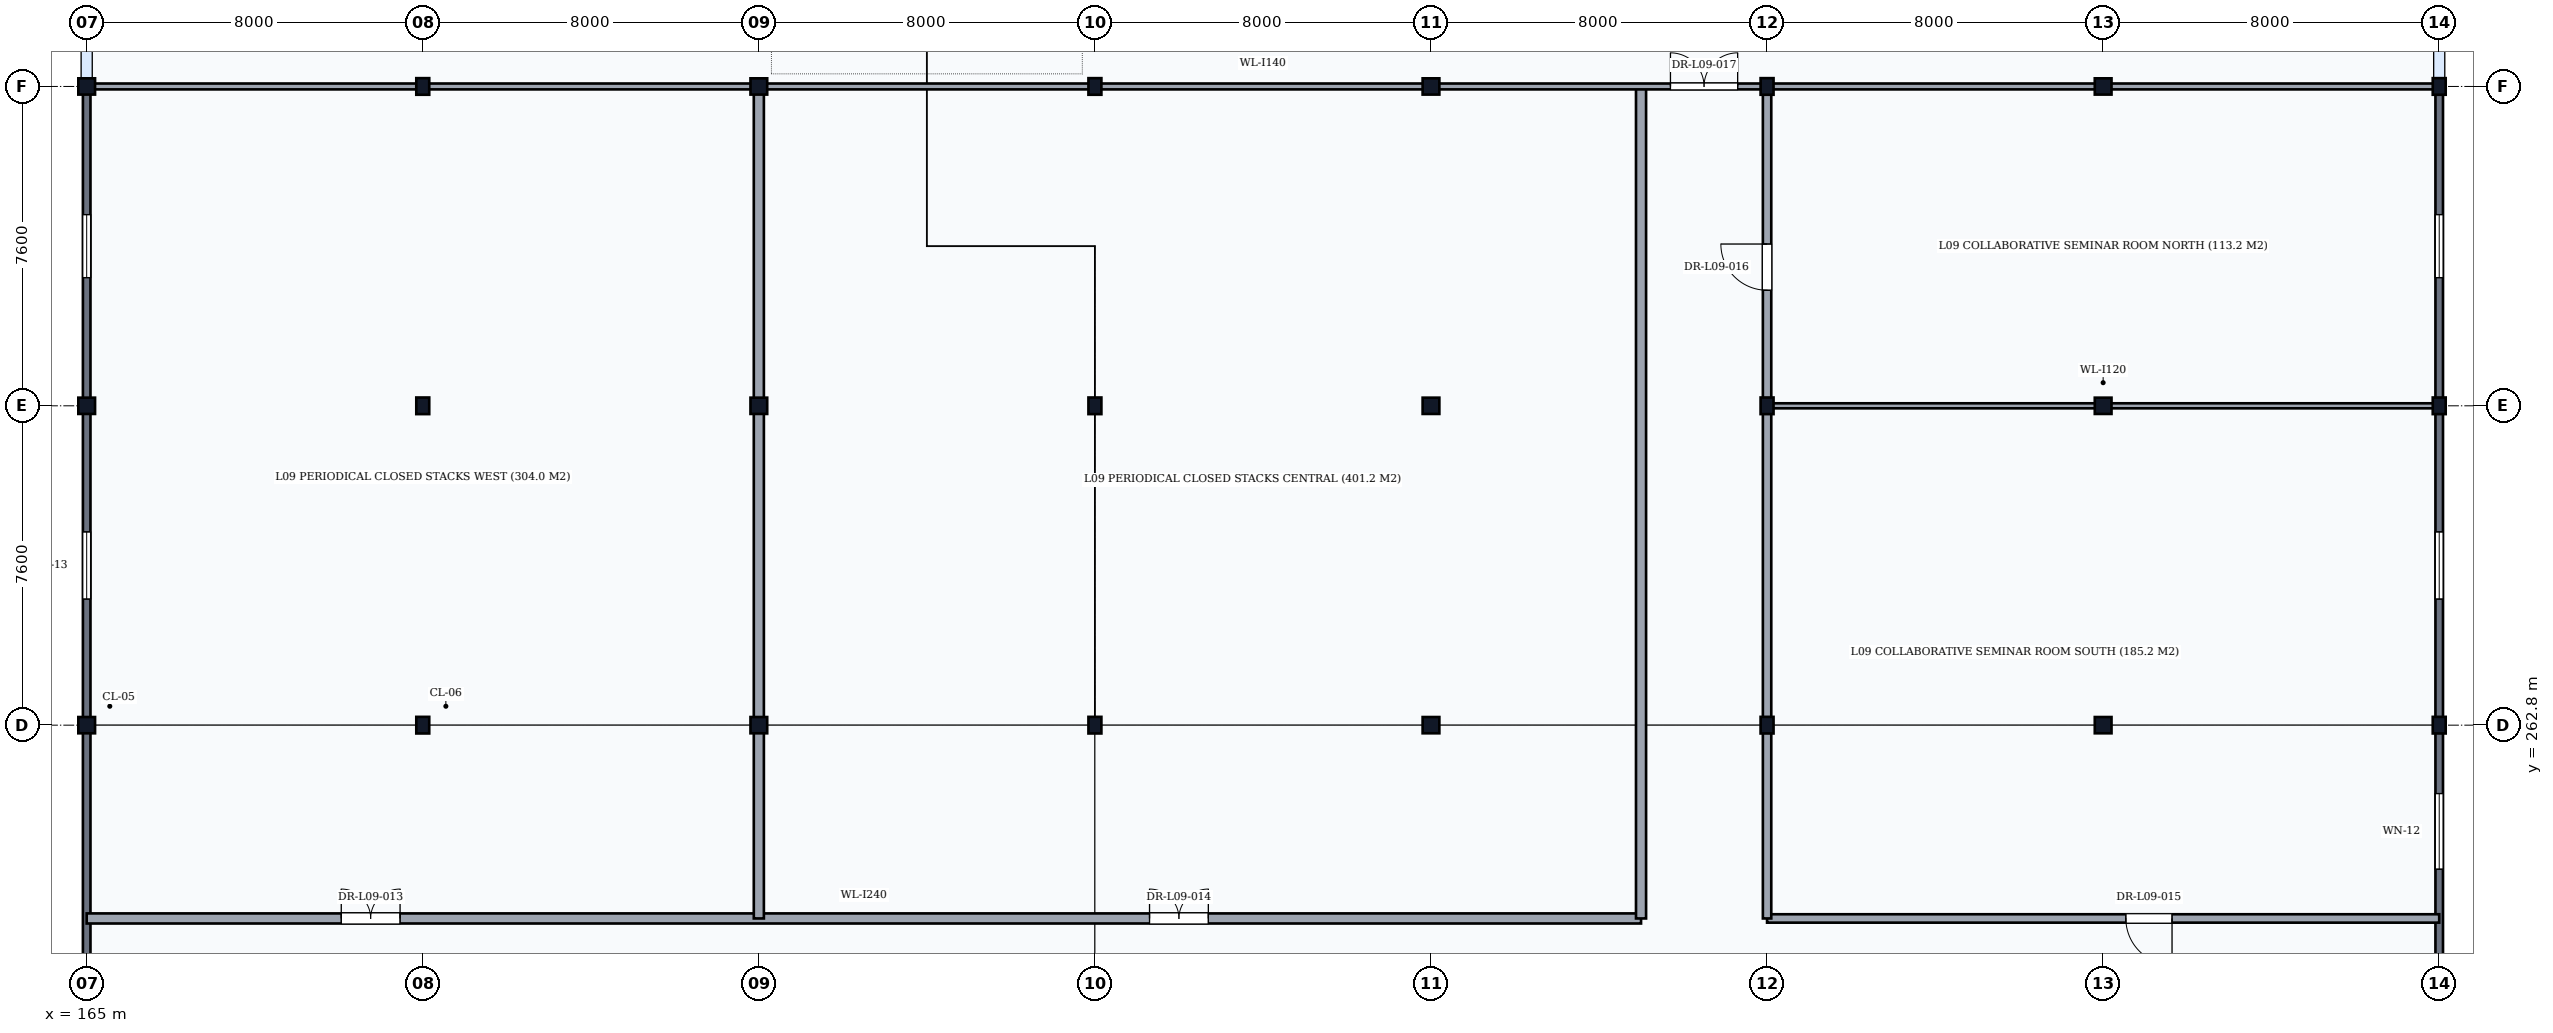
"""IFC4 building model, lengths in metres.
Left out: names, types, materials, properties, quantities, classifications, styles, units other than length and angle.
Written with IfcOpenShell. Run it as: python <this file> out.ifc"""

import sys

from ifc_helpers import new_model, si_unit, direction, frame, frame_2d, origin, origin_2d, place, context, subcontext, project, spatial, rectangle, i_section, extrude, element, fill, save


model = new_model("IFC4")
c1 = context("Model", 3, precision=1e-05, world=origin(), true_north=direction((0.0, 1.0)))
c2 = subcontext(c1, "Body", "Model", "MODEL_VIEW")
j1 = project(units=[si_unit("LENGTHUNIT", "METRE"), si_unit("PLANEANGLEUNIT", "RADIAN")], contexts=[c1])
p1 = place(None, origin())
s1 = spatial("IfcSite", under=j1, at=p1, CompositionType="ELEMENT")
p2 = place(p1, origin())
s2 = spatial("IfcBuilding", under=s1, at=p2, CompositionType="ELEMENT")
p3 = place(p2, frame((0.0, 0.0, 36.0)))
s3 = spatial("IfcBuildingStorey", under=s2, at=p3, CompositionType="ELEMENT", Elevation=36.0)
for number, where, z_axis, x_axis in (
    (1, (165.0, 262.8, 0.0), (0.0, 0.0, 1.0), (1.0, 0.0, 0.0)),
    (2, (165.0, 270.4, 0.0), (0.0, 0.0, 1.0), (1.0, 0.0, 0.0)),
    (3, (165.0, 278.0, 0.0), (0.0, 0.0, 1.0), (1.0, 0.0, 0.0)),
):
    element("IfcColumn", number, at=place(p3, frame(where, z_axis=z_axis, x_axis=x_axis)), inside=s3, PredefinedType="COLUMN", context=c2, shape_type="SweptSolid", body=[
        extrude(i_section(OverallWidth=0.398, OverallDepth=0.387, WebThickness=0.021, FlangeThickness=0.033, FilletRadius=0.015, at=origin_2d()), origin(), (0.0, 0.0, 1.0), 3.9),
    ])
for number, where, z_axis, x_axis in (
    (4, (173.0, 262.8, 0.0), (0.0, 0.0, 1.0), (1.0, 0.0, 0.0)),
    (5, (173.0, 270.4, 0.0), (0.0, 0.0, 1.0), (1.0, 0.0, 0.0)),
    (6, (173.0, 278.0, 0.0), (0.0, 0.0, 1.0), (1.0, 0.0, 0.0)),
):
    element("IfcColumn", number, at=place(p3, frame(where, z_axis=z_axis, x_axis=x_axis)), inside=s3, PredefinedType="COLUMN", context=c2, shape_type="SweptSolid", body=[
        extrude(i_section(OverallWidth=0.308, OverallDepth=0.395, WebThickness=0.021, FlangeThickness=0.04, FilletRadius=0.027, at=origin_2d()), origin(), (0.0, 0.0, 1.0), 3.9),
    ])
for number, where, z_axis, x_axis in (
    (7, (181.0, 262.8, 0.0), (0.0, 0.0, 1.0), (1.0, 0.0, 0.0)),
    (8, (181.0, 270.4, 0.0), (0.0, 0.0, 1.0), (1.0, 0.0, 0.0)),
    (9, (181.0, 278.0, 0.0), (0.0, 0.0, 1.0), (1.0, 0.0, 0.0)),
):
    element("IfcColumn", number, at=place(p3, frame(where, z_axis=z_axis, x_axis=x_axis)), inside=s3, PredefinedType="COLUMN", context=c2, shape_type="SweptSolid", body=[
        extrude(i_section(OverallWidth=0.398, OverallDepth=0.387, WebThickness=0.021, FlangeThickness=0.033, FilletRadius=0.015, at=origin_2d()), origin(), (0.0, 0.0, 1.0), 3.9),
    ])
for number, where, z_axis, x_axis in (
    (10, (189.0, 262.8, 0.0), (0.0, 0.0, 1.0), (1.0, 0.0, 0.0)),
    (11, (189.0, 270.4, 0.0), (0.0, 0.0, 1.0), (1.0, 0.0, 0.0)),
    (12, (189.0, 278.0, 0.0), (0.0, 0.0, 1.0), (1.0, 0.0, 0.0)),
):
    element("IfcColumn", number, at=place(p3, frame(where, z_axis=z_axis, x_axis=x_axis)), inside=s3, PredefinedType="COLUMN", context=c2, shape_type="SweptSolid", body=[
        extrude(i_section(OverallWidth=0.308, OverallDepth=0.395, WebThickness=0.021, FlangeThickness=0.04, FilletRadius=0.027, at=origin_2d()), origin(), (0.0, 0.0, 1.0), 3.9),
    ])
for number, where, z_axis, x_axis in (
    (13, (197.0, 262.8, 0.0), (0.0, 0.0, 1.0), (1.0, 0.0, 0.0)),
    (14, (197.0, 270.4, 0.0), (0.0, 0.0, 1.0), (1.0, 0.0, 0.0)),
    (15, (197.0, 278.0, 0.0), (0.0, 0.0, 1.0), (1.0, 0.0, 0.0)),
):
    element("IfcColumn", number, at=place(p3, frame(where, z_axis=z_axis, x_axis=x_axis)), inside=s3, PredefinedType="COLUMN", context=c2, shape_type="SweptSolid", body=[
        extrude(i_section(OverallWidth=0.398, OverallDepth=0.387, WebThickness=0.021, FlangeThickness=0.033, FilletRadius=0.015, at=origin_2d()), origin(), (0.0, 0.0, 1.0), 3.9),
    ])
for number, where, z_axis, x_axis in (
    (16, (205.0, 262.8, 0.0), (0.0, 0.0, 1.0), (1.0, 0.0, 0.0)),
    (17, (205.0, 270.4, 0.0), (0.0, 0.0, 1.0), (1.0, 0.0, 0.0)),
    (18, (205.0, 278.0, 0.0), (0.0, 0.0, 1.0), (1.0, 0.0, 0.0)),
):
    element("IfcColumn", number, at=place(p3, frame(where, z_axis=z_axis, x_axis=x_axis)), inside=s3, PredefinedType="COLUMN", context=c2, shape_type="SweptSolid", body=[
        extrude(i_section(OverallWidth=0.308, OverallDepth=0.395, WebThickness=0.021, FlangeThickness=0.04, FilletRadius=0.027, at=origin_2d()), origin(), (0.0, 0.0, 1.0), 3.9),
    ])
for number, where, z_axis, x_axis in (
    (19, (213.0, 262.8, 0.0), (0.0, 0.0, 1.0), (1.0, 0.0, 0.0)),
    (20, (213.0, 270.4, 0.0), (0.0, 0.0, 1.0), (1.0, 0.0, 0.0)),
    (21, (213.0, 278.0, 0.0), (0.0, 0.0, 1.0), (1.0, 0.0, 0.0)),
):
    element("IfcColumn", number, at=place(p3, frame(where, z_axis=z_axis, x_axis=x_axis)), inside=s3, PredefinedType="COLUMN", context=c2, shape_type="SweptSolid", body=[
        extrude(i_section(OverallWidth=0.398, OverallDepth=0.387, WebThickness=0.021, FlangeThickness=0.033, FilletRadius=0.015, at=origin_2d()), origin(), (0.0, 0.0, 1.0), 3.9),
    ])
for number, where, z_axis, x_axis in (
    (22, (221.0, 262.8, 0.0), (0.0, 0.0, 1.0), (1.0, 0.0, 0.0)),
    (23, (221.0, 270.4, 0.0), (0.0, 0.0, 1.0), (1.0, 0.0, 0.0)),
    (24, (221.0, 278.0, 0.0), (0.0, 0.0, 1.0), (1.0, 0.0, 0.0)),
):
    element("IfcColumn", number, at=place(p3, frame(where, z_axis=z_axis, x_axis=x_axis)), inside=s3, PredefinedType="COLUMN", context=c2, shape_type="SweptSolid", body=[
        extrude(i_section(OverallWidth=0.308, OverallDepth=0.395, WebThickness=0.021, FlangeThickness=0.04, FilletRadius=0.027, at=origin_2d()), origin(), (0.0, 0.0, 1.0), 3.9),
    ])
p4 = place(p3, frame((165.0, 255.206, 0.0), z_axis=(0.0, 0.0, 1.0), x_axis=(0.0, 1.0, 0.0)))
e25 = element("IfcWall", 25, at=p4, inside=s3, PredefinedType="SOLIDWALL", context=c2, shape_type="SweptSolid", body=[
    extrude(rectangle(XDim=7.588, YDim=0.18, at=frame_2d((3.794, 0.0))), origin(), (0.0, 0.0, 1.0), 3.408),
])
p5 = place(p3, frame((165.0, 262.806, 0.0), z_axis=(0.0, 0.0, 1.0), x_axis=(0.0, 1.0, 0.0)))
e26 = element("IfcWall", 26, at=p5, inside=s3, PredefinedType="SOLIDWALL", context=c2, shape_type="SweptSolid", body=[
    extrude(rectangle(XDim=7.588, YDim=0.18, at=frame_2d((3.794, 0.0))), origin(), (0.0, 0.0, 1.0), 3.408),
])
p6 = place(p5, frame((2.994, 0.0, 0.95)))
e27 = element("IfcOpeningElement", 27, at=p6, cuts=e26, PredefinedType="OPENING", context=c2, shape_type="SweptSolid", body=[
    extrude(rectangle(XDim=1.6, YDim=2.0, at=frame_2d((0.8, 1.0))), frame((0.0, 0.105, 0.0), z_axis=(0.0, -1.0, 0.0), x_axis=(1.0, 0.0, 0.0)), (0.0, 0.0, 1.0), 0.21),
])
p7 = place(p3, frame((165.0, 270.406, 0.0), z_axis=(0.0, 0.0, 1.0), x_axis=(0.0, 1.0, 0.0)))
e28 = element("IfcWall", 28, at=p7, inside=s3, PredefinedType="SOLIDWALL", context=c2, shape_type="SweptSolid", body=[
    extrude(rectangle(XDim=7.588, YDim=0.18, at=frame_2d((3.794, 0.0))), origin(), (0.0, 0.0, 1.0), 3.408),
])
p8 = place(p7, frame((3.044, 0.0, 0.95)))
e29 = element("IfcOpeningElement", 29, at=p8, cuts=e28, PredefinedType="OPENING", context=c2, shape_type="SweptSolid", body=[
    extrude(rectangle(XDim=1.5, YDim=1.9, at=frame_2d((0.75, 0.95))), frame((0.0, 0.105, 0.0), z_axis=(0.0, -1.0, 0.0), x_axis=(1.0, 0.0, 0.0)), (0.0, 0.0, 1.0), 0.21),
])
p9 = place(p3, frame((221.0, 255.206, 0.0), z_axis=(0.0, 0.0, 1.0), x_axis=(0.0, 1.0, 0.0)))
e30 = element("IfcWall", 30, at=p9, inside=s3, PredefinedType="SOLIDWALL", context=c2, shape_type="SweptSolid", body=[
    extrude(rectangle(XDim=7.588, YDim=0.18, at=frame_2d((3.794, 0.0))), origin(), (0.0, 0.0, 1.0), 3.408),
])
p10 = place(p9, frame((4.166, 0.0, 0.95)))
e31 = element("IfcOpeningElement", 31, at=p10, cuts=e30, PredefinedType="OPENING", context=c2, shape_type="SweptSolid", body=[
    extrude(rectangle(XDim=1.8, YDim=2.0, at=frame_2d((0.9, 1.0))), frame((0.0, 0.105, 0.0), z_axis=(0.0, -1.0, 0.0), x_axis=(1.0, 0.0, 0.0)), (0.0, 0.0, 1.0), 0.21),
])
p11 = place(p3, frame((221.0, 262.806, 0.0), z_axis=(0.0, 0.0, 1.0), x_axis=(0.0, 1.0, 0.0)))
e32 = element("IfcWall", 32, at=p11, inside=s3, PredefinedType="SOLIDWALL", context=c2, shape_type="SweptSolid", body=[
    extrude(rectangle(XDim=7.588, YDim=0.18, at=frame_2d((3.794, 0.0))), origin(), (0.0, 0.0, 1.0), 3.408),
])
p12 = place(p11, frame((2.994, 0.0, 0.95)))
e33 = element("IfcOpeningElement", 33, at=p12, cuts=e32, PredefinedType="OPENING", context=c2, shape_type="SweptSolid", body=[
    extrude(rectangle(XDim=1.6, YDim=2.0, at=frame_2d((0.8, 1.0))), frame((0.0, 0.105, 0.0), z_axis=(0.0, -1.0, 0.0), x_axis=(1.0, 0.0, 0.0)), (0.0, 0.0, 1.0), 0.21),
])
p13 = place(p3, frame((221.0, 270.406, 0.0), z_axis=(0.0, 0.0, 1.0), x_axis=(0.0, 1.0, 0.0)))
e34 = element("IfcWall", 34, at=p13, inside=s3, PredefinedType="SOLIDWALL", context=c2, shape_type="SweptSolid", body=[
    extrude(rectangle(XDim=7.588, YDim=0.18, at=frame_2d((3.794, 0.0))), origin(), (0.0, 0.0, 1.0), 3.408),
])
p14 = place(p13, frame((3.044, 0.0, 0.95)))
e35 = element("IfcOpeningElement", 35, at=p14, cuts=e34, PredefinedType="OPENING", context=c2, shape_type="SweptSolid", body=[
    extrude(rectangle(XDim=1.5, YDim=1.9, at=frame_2d((0.75, 0.95))), frame((0.0, 0.105, 0.0), z_axis=(0.0, -1.0, 0.0), x_axis=(1.0, 0.0, 0.0)), (0.0, 0.0, 1.0), 0.21),
])
p15 = place(p3, frame((165.0, 258.2, 0.0), z_axis=(0.0, 0.0, 1.0), x_axis=(1.0, 0.0, 0.0)))
e36 = element("IfcWall", 36, at=p15, inside=s3, PredefinedType="PARTITIONING", context=c2, shape_type="SweptSolid", body=[
    extrude(rectangle(XDim=37.0, YDim=0.24, at=frame_2d((18.5, 0.0))), origin(), (0.0, 0.0, 1.0), 3.68),
])
p16 = place(p15, frame((6.06, 0.0, 0.0)))
e37 = element("IfcOpeningElement", 37, at=p16, cuts=e36, PredefinedType="OPENING", context=c2, shape_type="SweptSolid", body=[
    extrude(rectangle(XDim=1.4, YDim=2.1, at=frame_2d((0.7, 1.05))), frame((0.0, 0.135, 0.0), z_axis=(0.0, -1.0, 0.0), x_axis=(1.0, 0.0, 0.0)), (0.0, 0.0, 1.0), 0.27),
])
p17 = place(p15, frame((25.3, 0.0, 0.0)))
e38 = element("IfcOpeningElement", 38, at=p17, cuts=e36, PredefinedType="OPENING", context=c2, shape_type="SweptSolid", body=[
    extrude(rectangle(XDim=1.4, YDim=2.1, at=frame_2d((0.7, 1.05))), frame((0.0, 0.135, 0.0), z_axis=(0.0, -1.0, 0.0), x_axis=(1.0, 0.0, 0.0)), (0.0, 0.0, 1.0), 0.27),
])
p18 = place(p3, frame((181.0, 258.2, 0.0), z_axis=(0.0, 0.0, 1.0), x_axis=(0.0, 1.0, 0.0)))
e39 = element("IfcWall", 39, at=p18, inside=s3, PredefinedType="PARTITIONING", context=c2, shape_type="SweptSolid", body=[
    extrude(rectangle(XDim=19.8, YDim=0.24, at=frame_2d((9.9, 0.0))), origin(), (0.0, 0.0, 1.0), 3.278),
])
p19 = place(p3, frame((202.0, 258.2, 0.0), z_axis=(0.0, 0.0, 1.0), x_axis=(0.0, 1.0, 0.0)))
e40 = element("IfcWall", 40, at=p19, inside=s3, PredefinedType="PARTITIONING", context=c2, shape_type="SweptSolid", body=[
    extrude(rectangle(XDim=19.8, YDim=0.24, at=frame_2d((9.9, 0.0))), origin(), (0.0, 0.0, 1.0), 3.68),
])
p20 = place(p3, frame((205.0, 258.2, 0.0), z_axis=(0.0, 0.0, 1.0), x_axis=(1.0, 0.0, 0.0)))
e41 = element("IfcWall", 41, at=p20, inside=s3, PredefinedType="PARTITIONING", context=c2, shape_type="SweptSolid", body=[
    extrude(rectangle(XDim=16.0, YDim=0.2, at=frame_2d((8.0, 0.0))), origin(), (0.0, 0.0, 1.0), 3.68),
])
p21 = place(p20, frame((8.54, 0.0, 0.0)))
e42 = element("IfcOpeningElement", 42, at=p21, cuts=e41, PredefinedType="OPENING", context=c2, shape_type="SweptSolid", body=[
    extrude(rectangle(XDim=1.1, YDim=2.1, at=frame_2d((0.55, 1.05))), frame((0.0, 0.115, 0.0), z_axis=(0.0, -1.0, 0.0), x_axis=(1.0, 0.0, 0.0)), (0.0, 0.0, 1.0), 0.23),
])
p22 = place(p3, frame((205.0, 258.2, 0.0), z_axis=(0.0, 0.0, 1.0), x_axis=(0.0, 1.0, 0.0)))
e43 = element("IfcWall", 43, at=p22, inside=s3, PredefinedType="PARTITIONING", context=c2, shape_type="SweptSolid", body=[
    extrude(rectangle(XDim=19.8, YDim=0.2, at=frame_2d((9.9, 0.0))), origin(), (0.0, 0.0, 1.0), 3.278),
])
p23 = place(p22, frame((14.95, 0.0, 0.0)))
e44 = element("IfcOpeningElement", 44, at=p23, cuts=e43, PredefinedType="OPENING", context=c2, shape_type="SweptSolid", body=[
    extrude(rectangle(XDim=1.1, YDim=2.1, at=frame_2d((0.55, 1.05))), frame((0.0, 0.115, 0.0), z_axis=(0.0, -1.0, 0.0), x_axis=(1.0, 0.0, 0.0)), (0.0, 0.0, 1.0), 0.23),
])
p24 = place(p3, frame((205.0, 270.4, 0.0), z_axis=(0.0, 0.0, 1.0), x_axis=(1.0, 0.0, 0.0)))
e45 = element("IfcWall", 45, at=p24, inside=s3, PredefinedType="PARTITIONING", context=c2, shape_type="SweptSolid", body=[
    extrude(rectangle(XDim=16.0, YDim=0.12, at=frame_2d((8.0, 0.0))), origin(), (0.0, 0.0, 1.0), 3.178),
])
p25 = place(p3, frame((165.0, 278.0, 0.0), z_axis=(0.0, 0.0, 1.0), x_axis=(1.0, 0.0, 0.0)))
e46 = element("IfcWall", 46, at=p25, inside=s3, PredefinedType="PARTITIONING", context=c2, shape_type="SweptSolid", body=[
    extrude(rectangle(XDim=56.0, YDim=0.14, at=frame_2d((28.0, 0.0))), origin(), (0.0, 0.0, 1.0), 3.178),
])
p26 = place(p25, frame((37.7, 0.0, 0.0)))
e47 = element("IfcOpeningElement", 47, at=p26, cuts=e46, PredefinedType="OPENING", context=c2, shape_type="SweptSolid", body=[
    extrude(rectangle(XDim=1.6, YDim=2.25, at=frame_2d((0.8, 1.125))), frame((0.0, 0.085, 0.0), z_axis=(0.0, -1.0, 0.0), x_axis=(1.0, 0.0, 0.0)), (0.0, 0.0, 1.0), 0.17),
])
p27 = place(p6, origin())
e48 = element("IfcWindow", 48, at=p27, inside=s3, PartitioningType="SINGLE_PANEL", PredefinedType="WINDOW", context=c2, shape_type="SweptSolid", body=[
    extrude(rectangle(XDim=1.6, YDim=2.0, at=frame_2d((0.8, 1.0))), frame((0.0, 0.03, 0.0), z_axis=(0.0, -1.0, 0.0), x_axis=(1.0, 0.0, 0.0)), (0.0, 0.0, 1.0), 0.06),
])
fill(e27, e48)
p28 = place(p8, origin())
e49 = element("IfcWindow", 49, at=p28, inside=s3, PartitioningType="SINGLE_PANEL", PredefinedType="WINDOW", context=c2, shape_type="SweptSolid", body=[
    extrude(rectangle(XDim=1.5, YDim=1.9, at=frame_2d((0.75, 0.95))), frame((0.0, 0.03, 0.0), z_axis=(0.0, -1.0, 0.0), x_axis=(1.0, 0.0, 0.0)), (0.0, 0.0, 1.0), 0.06),
])
fill(e29, e49)
p29 = place(p10, origin())
e50 = element("IfcWindow", 50, at=p29, inside=s3, PartitioningType="DOUBLE_PANEL_VERTICAL", PredefinedType="WINDOW", context=c2, shape_type="SweptSolid", body=[
    extrude(rectangle(XDim=1.8, YDim=2.0, at=frame_2d((0.9, 1.0))), frame((0.0, 0.03, 0.0), z_axis=(0.0, -1.0, 0.0), x_axis=(1.0, 0.0, 0.0)), (0.0, 0.0, 1.0), 0.06),
])
fill(e31, e50)
p30 = place(p12, origin())
e51 = element("IfcWindow", 51, at=p30, inside=s3, PartitioningType="SINGLE_PANEL", PredefinedType="WINDOW", context=c2, shape_type="SweptSolid", body=[
    extrude(rectangle(XDim=1.6, YDim=2.0, at=frame_2d((0.8, 1.0))), frame((0.0, 0.03, 0.0), z_axis=(0.0, -1.0, 0.0), x_axis=(1.0, 0.0, 0.0)), (0.0, 0.0, 1.0), 0.06),
])
fill(e33, e51)
p31 = place(p14, origin())
e52 = element("IfcWindow", 52, at=p31, inside=s3, PartitioningType="SINGLE_PANEL", PredefinedType="WINDOW", context=c2, shape_type="SweptSolid", body=[
    extrude(rectangle(XDim=1.5, YDim=1.9, at=frame_2d((0.75, 0.95))), frame((0.0, 0.03, 0.0), z_axis=(0.0, -1.0, 0.0), x_axis=(1.0, 0.0, 0.0)), (0.0, 0.0, 1.0), 0.06),
])
fill(e35, e52)
p32 = place(p16, origin())
e53 = element("IfcDoor", 53, at=p32, inside=s3, OperationType="DOUBLE_DOOR_SINGLE_SWING", PredefinedType="DOOR", context=c2, shape_type="SweptSolid", body=[
    extrude(rectangle(XDim=1.4, YDim=2.1, at=frame_2d((0.7, 1.05))), frame((0.0, 0.025, 0.0), z_axis=(0.0, -1.0, 0.0), x_axis=(1.0, 0.0, 0.0)), (0.0, 0.0, 1.0), 0.05),
])
fill(e37, e53)
p33 = place(p17, origin())
e54 = element("IfcDoor", 54, at=p33, inside=s3, OperationType="DOUBLE_DOOR_SINGLE_SWING", PredefinedType="DOOR", context=c2, shape_type="SweptSolid", body=[
    extrude(rectangle(XDim=1.4, YDim=2.1, at=frame_2d((0.7, 1.05))), frame((0.0, 0.025, 0.0), z_axis=(0.0, -1.0, 0.0), x_axis=(1.0, 0.0, 0.0)), (0.0, 0.0, 1.0), 0.05),
])
fill(e38, e54)
p34 = place(p21, origin())
e55 = element("IfcDoor", 55, at=p34, inside=s3, OperationType="SINGLE_SWING_RIGHT", PredefinedType="DOOR", context=c2, shape_type="SweptSolid", body=[
    extrude(rectangle(XDim=1.1, YDim=2.1, at=frame_2d((0.55, 1.05))), frame((0.0, 0.025, 0.0), z_axis=(0.0, -1.0, 0.0), x_axis=(1.0, 0.0, 0.0)), (0.0, 0.0, 1.0), 0.05),
])
fill(e42, e55)
p35 = place(p23, frame((1.1, 0.0, 0.0), z_axis=(0.0, 0.0, 1.0), x_axis=(-1.0, 0.0, 0.0)))
e56 = element("IfcDoor", 56, at=p35, inside=s3, OperationType="SINGLE_SWING_LEFT", PredefinedType="DOOR", context=c2, shape_type="SweptSolid", body=[
    extrude(rectangle(XDim=1.1, YDim=2.1, at=frame_2d((0.55, 1.05))), frame((0.0, 0.025, 0.0), z_axis=(0.0, -1.0, 0.0), x_axis=(1.0, 0.0, 0.0)), (0.0, 0.0, 1.0), 0.05),
])
fill(e44, e56)
p36 = place(p26, origin())
e57 = element("IfcDoor", 57, at=p36, inside=s3, OperationType="DOUBLE_DOOR_SINGLE_SWING", PredefinedType="DOOR", context=c2, shape_type="SweptSolid", body=[
    extrude(rectangle(XDim=1.6, YDim=2.25, at=frame_2d((0.8, 1.125))), frame((0.0, 0.025, 0.0), z_axis=(0.0, -1.0, 0.0), x_axis=(1.0, 0.0, 0.0)), (0.0, 0.0, 1.0), 0.05),
])
fill(e47, e57)
save(model, sys.argv[1])
